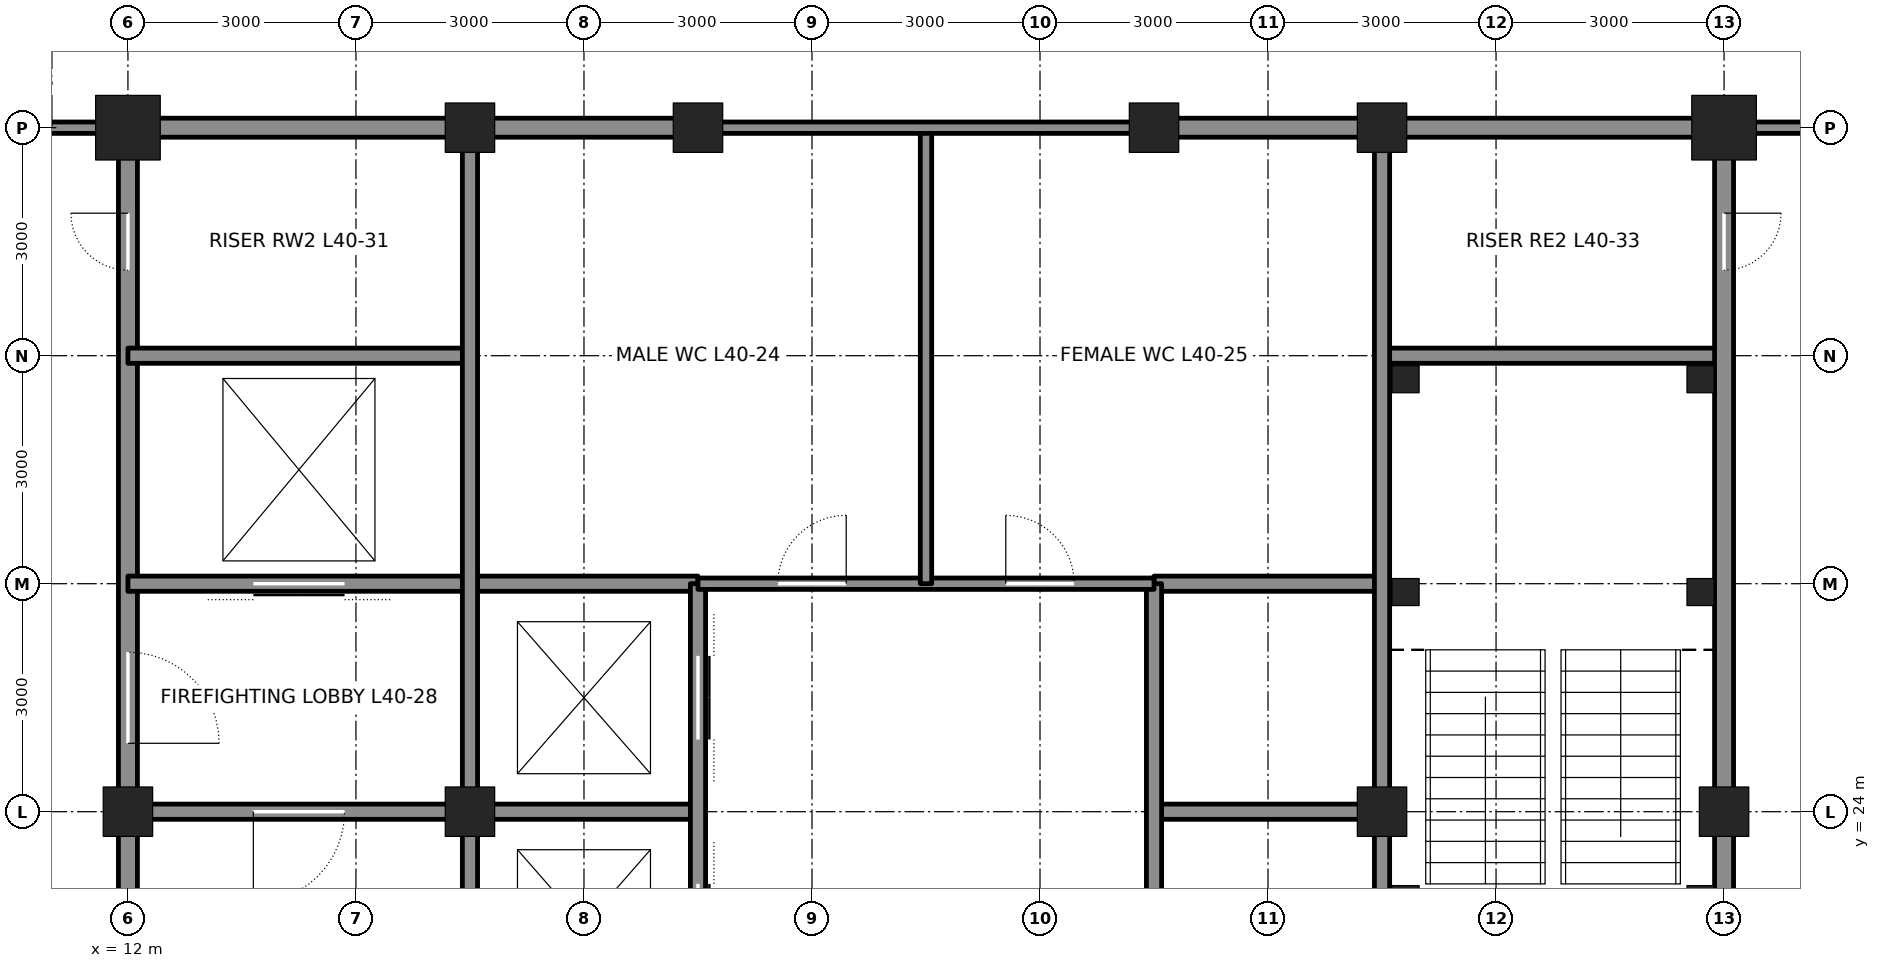
"""IFC4 building model, lengths in metres.
Left out: names, types, materials, properties, quantities, classifications, styles, units other than length and angle.
Written with IfcOpenShell. Run it as: python <this file> out.ifc"""

import sys

from ifc_helpers import new_model, si_unit, direction, frame, frame_2d, origin, origin_2d, place, context, subcontext, project, spatial, rectangle, hollow_rectangle, extrude, element, fill, save


model = new_model("IFC4")
c1 = context("Model", 3, precision=1e-05, world=origin(), true_north=direction((0.0, 1.0)))
c2 = subcontext(c1, "Body", "Model", "MODEL_VIEW")
j1 = project(units=[si_unit("LENGTHUNIT", "METRE"), si_unit("PLANEANGLEUNIT", "RADIAN")], contexts=[c1])
p1 = place(None, origin())
s1 = spatial("IfcSite", under=j1, at=p1, CompositionType="ELEMENT")
p2 = place(p1, origin())
s2 = spatial("IfcBuilding", under=s1, at=p2, CompositionType="ELEMENT")
p3 = place(p2, frame((0.0, 0.0, 184.5)))
s3 = spatial("IfcBuildingStorey", under=s2, at=p3, CompositionType="ELEMENT", Elevation=184.5)
p4 = place(p3, frame((12.0, 33.0, 0.0), z_axis=(0.0, 0.0, 1.0), x_axis=(1.0, 0.0, 0.0)))
e1 = element("IfcColumn", 1, at=p4, inside=s3, PredefinedType="COLUMN", context=c2, shape_type="SweptSolid", body=[
    extrude(hollow_rectangle(XDim=0.85, YDim=0.85, WallThickness=0.085, at=origin_2d()), origin(), (0.0, 0.0, 1.0), 4.2),
])
for number, where, z_axis, x_axis in (
    (2, (16.5, 33.0, 0.0), (0.0, 0.0, 1.0), (1.0, 0.0, 0.0)),
    (3, (19.5, 33.0, 0.0), (0.0, 0.0, 1.0), (1.0, 0.0, 0.0)),
    (4, (25.5, 33.0, 0.0), (0.0, 0.0, 1.0), (1.0, 0.0, 0.0)),
    (5, (28.5, 33.0, 0.0), (0.0, 0.0, 1.0), (1.0, 0.0, 0.0)),
):
    element("IfcColumn", number, at=place(p3, frame(where, z_axis=z_axis, x_axis=x_axis)), inside=s3, PredefinedType="COLUMN", context=c2, shape_type="SweptSolid", body=[
        extrude(hollow_rectangle(XDim=0.65, YDim=0.65, WallThickness=0.065, at=origin_2d()), origin(), (0.0, 0.0, 1.0), 4.2),
    ])
p5 = place(p3, frame((33.0, 33.0, 0.0), z_axis=(0.0, 0.0, 1.0), x_axis=(1.0, 0.0, 0.0)))
e6 = element("IfcColumn", 6, at=p5, inside=s3, PredefinedType="COLUMN", context=c2, shape_type="SweptSolid", body=[
    extrude(hollow_rectangle(XDim=0.85, YDim=0.85, WallThickness=0.085, at=origin_2d()), origin(), (0.0, 0.0, 1.0), 4.2),
])
for number, where, z_axis, x_axis in (
    (7, (12.0, 24.0, 0.0), (0.0, 0.0, 1.0), (1.0, 0.0, 0.0)),
    (8, (33.0, 24.0, 0.0), (0.0, 0.0, 1.0), (1.0, 0.0, 0.0)),
    (9, (16.5, 24.0, 0.0), (0.0, 0.0, 1.0), (1.0, 0.0, 0.0)),
    (10, (28.5, 24.0, 0.0), (0.0, 0.0, 1.0), (1.0, 0.0, 0.0)),
):
    element("IfcColumn", number, at=place(p3, frame(where, z_axis=z_axis, x_axis=x_axis)), inside=s3, PredefinedType="COLUMN", context=c2, shape_type="SweptSolid", body=[
        extrude(hollow_rectangle(XDim=0.65, YDim=0.65, WallThickness=0.065, at=origin_2d()), origin(), (0.0, 0.0, 1.0), 4.2),
    ])
p6 = place(p3, frame((12.0, 21.25, 0.0), z_axis=(0.0, 0.0, 1.0), x_axis=(0.0, 1.0, 0.0)))
e11 = element("IfcWall", 11, at=p6, inside=s3, PredefinedType="SOLIDWALL", context=c2, shape_type="SweptSolid", body=[
    extrude(rectangle(XDim=2.5, YDim=0.25, at=frame_2d((1.25, 0.0))), origin(), (0.0, 0.0, 1.0), 3.113),
])
p7 = place(p3, frame((12.0, 24.25, 0.0), z_axis=(0.0, 0.0, 1.0), x_axis=(0.0, 1.0, 0.0)))
e12 = element("IfcWall", 12, at=p7, inside=s3, PredefinedType="SOLIDWALL", context=c2, shape_type="SweptSolid", body=[
    extrude(rectangle(XDim=8.5, YDim=0.25, at=frame_2d((4.25, 0.0))), origin(), (0.0, 0.0, 1.0), 3.113),
])
p8 = place(p7, frame((0.65, 0.0, 0.0)))
e13 = element("IfcOpeningElement", 13, at=p8, cuts=e12, PredefinedType="OPENING", context=c2, shape_type="SweptSolid", body=[
    extrude(rectangle(XDim=1.2, YDim=2.1, at=frame_2d((0.6, 1.05))), frame((0.0, 0.135, 0.0), z_axis=(0.0, -1.0, 0.0), x_axis=(1.0, 0.0, 0.0)), (0.0, 0.0, 1.0), 0.27),
])
p9 = place(p7, frame((6.875, 0.0, 0.0)))
e14 = element("IfcOpeningElement", 14, at=p9, cuts=e12, PredefinedType="OPENING", context=c2, shape_type="SweptSolid", body=[
    extrude(rectangle(XDim=0.75, YDim=2.1, at=frame_2d((0.375, 1.05))), frame((0.0, 0.135, 0.0), z_axis=(0.0, -1.0, 0.0), x_axis=(1.0, 0.0, 0.0)), (0.0, 0.0, 1.0), 0.27),
])
p10 = place(p3, frame((12.25, 24.0, 0.0), z_axis=(0.0, 0.0, 1.0), x_axis=(1.0, 0.0, 0.0)))
e15 = element("IfcWall", 15, at=p10, inside=s3, PredefinedType="SOLIDWALL", context=c2, shape_type="SweptSolid", body=[
    extrude(rectangle(XDim=4.0, YDim=0.2, at=frame_2d((2.0, 0.0))), origin(), (0.0, 0.0, 1.0), 3.09),
])
p11 = place(p10, frame((1.4, 0.0, 0.0)))
e16 = element("IfcOpeningElement", 16, at=p11, cuts=e15, PredefinedType="OPENING", context=c2, shape_type="SweptSolid", body=[
    extrude(rectangle(XDim=1.2, YDim=2.1, at=frame_2d((0.6, 1.05))), frame((0.0, 0.11, 0.0), z_axis=(0.0, -1.0, 0.0), x_axis=(1.0, 0.0, 0.0)), (0.0, 0.0, 1.0), 0.22),
])
for number, where, z_axis, x_axis in (
    (17, (16.75, 24.0, 0.0), (0.0, 0.0, 1.0), (1.0, 0.0, 0.0)),
    (18, (25.5, 24.0, 0.0), (0.0, 0.0, 1.0), (1.0, 0.0, 0.0)),
):
    element("IfcWall", number, at=place(p3, frame(where, z_axis=z_axis, x_axis=x_axis)), inside=s3, PredefinedType="SOLIDWALL", context=c2, shape_type="SweptSolid", body=[
        extrude(rectangle(XDim=2.75, YDim=0.2, at=frame_2d((1.375, 0.0))), origin(), (0.0, 0.0, 1.0), 3.09),
    ])
p12 = place(p3, frame((12.0, 27.0, 0.0), z_axis=(0.0, 0.0, 1.0), x_axis=(1.0, 0.0, 0.0)))
e19 = element("IfcWall", 19, at=p12, inside=s3, PredefinedType="SOLIDWALL", context=c2, shape_type="SweptSolid", body=[
    extrude(rectangle(XDim=7.5, YDim=0.2, at=frame_2d((3.75, 0.0))), origin(), (0.0, 0.0, 1.0), 4.04),
])
p13 = place(p12, frame((1.65, 0.0, 0.0)))
e20 = element("IfcOpeningElement", 20, at=p13, cuts=e19, PredefinedType="OPENING", context=c2, shape_type="SweptSolid", body=[
    extrude(rectangle(XDim=1.2, YDim=2.1, at=frame_2d((0.6, 1.05))), frame((0.0, 0.11, 0.0), z_axis=(0.0, -1.0, 0.0), x_axis=(1.0, 0.0, 0.0)), (0.0, 0.0, 1.0), 0.22),
])
p14 = place(p3, frame((25.5, 27.0, 0.0), z_axis=(0.0, 0.0, 1.0), x_axis=(1.0, 0.0, 0.0)))
e21 = element("IfcWall", 21, at=p14, inside=s3, PredefinedType="SOLIDWALL", context=c2, shape_type="SweptSolid", body=[
    extrude(rectangle(XDim=3.0, YDim=0.2, at=frame_2d((1.5, 0.0))), origin(), (0.0, 0.0, 1.0), 4.04),
])
for number, where, z_axis, x_axis in (
    (22, (12.0, 30.0, 0.0), (0.0, 0.0, 1.0), (1.0, 0.0, 0.0)),
    (23, (28.5, 30.0, 0.0), (0.0, 0.0, 1.0), (1.0, 0.0, 0.0)),
):
    element("IfcWall", number, at=place(p3, frame(where, z_axis=z_axis, x_axis=x_axis)), inside=s3, PredefinedType="SOLIDWALL", context=c2, shape_type="SweptSolid", body=[
        extrude(rectangle(XDim=4.5, YDim=0.2, at=frame_2d((2.25, 0.0))), origin(), (0.0, 0.0, 1.0), 4.04),
    ])
p15 = place(p3, frame((12.25, 33.0, 0.0), z_axis=(0.0, 0.0, 1.0), x_axis=(1.0, 0.0, 0.0)))
e24 = element("IfcWall", 24, at=p15, inside=s3, PredefinedType="SOLIDWALL", context=c2, shape_type="SweptSolid", body=[
    extrude(rectangle(XDim=4.0, YDim=0.25, at=frame_2d((2.0, 0.0))), origin(), (0.0, 0.0, 1.0), 3.181),
])
for number, where, z_axis, x_axis in (
    (25, (16.75, 33.0, 0.0), (0.0, 0.0, 1.0), (1.0, 0.0, 0.0)),
    (26, (25.75, 33.0, 0.0), (0.0, 0.0, 1.0), (1.0, 0.0, 0.0)),
):
    element("IfcWall", number, at=place(p3, frame(where, z_axis=z_axis, x_axis=x_axis)), inside=s3, PredefinedType="SOLIDWALL", context=c2, shape_type="SweptSolid", body=[
        extrude(rectangle(XDim=2.5, YDim=0.25, at=frame_2d((1.25, 0.0))), origin(), (0.0, 0.0, 1.0), 3.181),
    ])
p16 = place(p3, frame((28.75, 33.0, 0.0), z_axis=(0.0, 0.0, 1.0), x_axis=(1.0, 0.0, 0.0)))
e27 = element("IfcWall", 27, at=p16, inside=s3, PredefinedType="SOLIDWALL", context=c2, shape_type="SweptSolid", body=[
    extrude(rectangle(XDim=4.0, YDim=0.25, at=frame_2d((2.0, 0.0))), origin(), (0.0, 0.0, 1.0), 3.181),
])
p17 = place(p3, frame((16.5, 21.25, 0.0), z_axis=(0.0, 0.0, 1.0), x_axis=(0.0, 1.0, 0.0)))
e28 = element("IfcWall", 28, at=p17, inside=s3, PredefinedType="SOLIDWALL", context=c2, shape_type="SweptSolid", body=[
    extrude(rectangle(XDim=2.5, YDim=0.2, at=frame_2d((1.25, 0.0))), origin(), (0.0, 0.0, 1.0), 3.113),
])
p18 = place(p3, frame((16.5, 24.25, 0.0), z_axis=(0.0, 0.0, 1.0), x_axis=(0.0, 1.0, 0.0)))
e29 = element("IfcWall", 29, at=p18, inside=s3, PredefinedType="SOLIDWALL", context=c2, shape_type="SweptSolid", body=[
    extrude(rectangle(XDim=8.5, YDim=0.2, at=frame_2d((4.25, 0.0))), origin(), (0.0, 0.0, 1.0), 3.113),
])
p19 = place(p3, frame((19.5, 15.0, 0.0), z_axis=(0.0, 0.0, 1.0), x_axis=(0.0, 1.0, 0.0)))
e30 = element("IfcWall", 30, at=p19, inside=s3, PredefinedType="SOLIDWALL", context=c2, shape_type="SweptSolid", body=[
    extrude(rectangle(XDim=12.0, YDim=0.2, at=frame_2d((6.0, 0.0))), origin(), (0.0, 0.0, 1.0), 3.065),
])
p20 = place(p19, frame((0.95, 0.0, 0.0)))
e31 = element("IfcOpeningElement", 31, at=p20, cuts=e30, PredefinedType="OPENING", context=c2, shape_type="SweptSolid", body=[
    extrude(rectangle(XDim=1.1, YDim=2.1, at=frame_2d((0.55, 1.05))), frame((0.0, 0.11, 0.0), z_axis=(0.0, -1.0, 0.0), x_axis=(1.0, 0.0, 0.0)), (0.0, 0.0, 1.0), 0.22),
])
p21 = place(p19, frame((3.95, 0.0, 0.0)))
e32 = element("IfcOpeningElement", 32, at=p21, cuts=e30, PredefinedType="OPENING", context=c2, shape_type="SweptSolid", body=[
    extrude(rectangle(XDim=1.1, YDim=2.1, at=frame_2d((0.55, 1.05))), frame((0.0, 0.11, 0.0), z_axis=(0.0, -1.0, 0.0), x_axis=(1.0, 0.0, 0.0)), (0.0, 0.0, 1.0), 0.22),
])
p22 = place(p19, frame((6.95, 0.0, 0.0)))
e33 = element("IfcOpeningElement", 33, at=p22, cuts=e30, PredefinedType="OPENING", context=c2, shape_type="SweptSolid", body=[
    extrude(rectangle(XDim=1.1, YDim=2.1, at=frame_2d((0.55, 1.05))), frame((0.0, 0.11, 0.0), z_axis=(0.0, -1.0, 0.0), x_axis=(1.0, 0.0, 0.0)), (0.0, 0.0, 1.0), 0.22),
])
p23 = place(p19, frame((9.95, 0.0, 0.0)))
e34 = element("IfcOpeningElement", 34, at=p23, cuts=e30, PredefinedType="OPENING", context=c2, shape_type="SweptSolid", body=[
    extrude(rectangle(XDim=1.1, YDim=2.1, at=frame_2d((0.55, 1.05))), frame((0.0, 0.11, 0.0), z_axis=(0.0, -1.0, 0.0), x_axis=(1.0, 0.0, 0.0)), (0.0, 0.0, 1.0), 0.22),
])
p24 = place(p3, frame((25.5, 15.0, 0.0), z_axis=(0.0, 0.0, 1.0), x_axis=(0.0, 1.0, 0.0)))
e35 = element("IfcWall", 35, at=p24, inside=s3, PredefinedType="SOLIDWALL", context=c2, shape_type="SweptSolid", body=[
    extrude(rectangle(XDim=12.0, YDim=0.2, at=frame_2d((6.0, 0.0))), origin(), (0.0, 0.0, 1.0), 3.065),
])
p25 = place(p3, frame((28.5, 21.25, 0.0), z_axis=(0.0, 0.0, 1.0), x_axis=(0.0, 1.0, 0.0)))
e36 = element("IfcWall", 36, at=p25, inside=s3, PredefinedType="SOLIDWALL", context=c2, shape_type="SweptSolid", body=[
    extrude(rectangle(XDim=2.5, YDim=0.2, at=frame_2d((1.25, 0.0))), origin(), (0.0, 0.0, 1.0), 3.113),
])
p26 = place(p3, frame((28.5, 24.25, 0.0), z_axis=(0.0, 0.0, 1.0), x_axis=(0.0, 1.0, 0.0)))
e37 = element("IfcWall", 37, at=p26, inside=s3, PredefinedType="SOLIDWALL", context=c2, shape_type="SweptSolid", body=[
    extrude(rectangle(XDim=8.5, YDim=0.2, at=frame_2d((4.25, 0.0))), origin(), (0.0, 0.0, 1.0), 3.113),
])
p27 = place(p3, frame((33.0, 21.25, 0.0), z_axis=(0.0, 0.0, 1.0), x_axis=(0.0, 1.0, 0.0)))
e38 = element("IfcWall", 38, at=p27, inside=s3, PredefinedType="SOLIDWALL", context=c2, shape_type="SweptSolid", body=[
    extrude(rectangle(XDim=2.5, YDim=0.25, at=frame_2d((1.25, 0.0))), origin(), (0.0, 0.0, 1.0), 3.113),
])
p28 = place(p3, frame((33.0, 24.25, 0.0), z_axis=(0.0, 0.0, 1.0), x_axis=(0.0, 1.0, 0.0)))
e39 = element("IfcWall", 39, at=p28, inside=s3, PredefinedType="SOLIDWALL", context=c2, shape_type="SweptSolid", body=[
    extrude(rectangle(XDim=8.5, YDim=0.25, at=frame_2d((4.25, 0.0))), origin(), (0.0, 0.0, 1.0), 3.113),
])
p29 = place(p28, frame((6.875, 0.0, 0.0)))
e40 = element("IfcOpeningElement", 40, at=p29, cuts=e39, PredefinedType="OPENING", context=c2, shape_type="SweptSolid", body=[
    extrude(rectangle(XDim=0.75, YDim=2.1, at=frame_2d((0.375, 1.05))), frame((0.0, 0.135, 0.0), z_axis=(0.0, -1.0, 0.0), x_axis=(1.0, 0.0, 0.0)), (0.0, 0.0, 1.0), 0.27),
])
p30 = place(p3, frame((19.5, 27.0, 0.0), z_axis=(0.0, 0.0, 1.0), x_axis=(1.0, 0.0, 0.0)))
e41 = element("IfcWall", 41, at=p30, inside=s3, PredefinedType="PARTITIONING", context=c2, shape_type="SweptSolid", body=[
    extrude(rectangle(XDim=6.0, YDim=0.15, at=frame_2d((3.0, 0.0))), origin(), (0.0, 0.0, 1.0), 4.04),
])
p31 = place(p30, frame((1.05, 0.0, 0.0)))
e42 = element("IfcOpeningElement", 42, at=p31, cuts=e41, PredefinedType="OPENING", context=c2, shape_type="SweptSolid", body=[
    extrude(rectangle(XDim=0.9, YDim=2.1, at=frame_2d((0.45, 1.05))), frame((0.0, 0.085, 0.0), z_axis=(0.0, -1.0, 0.0), x_axis=(1.0, 0.0, 0.0)), (0.0, 0.0, 1.0), 0.17),
])
p32 = place(p30, frame((4.05, 0.0, 0.0)))
e43 = element("IfcOpeningElement", 43, at=p32, cuts=e41, PredefinedType="OPENING", context=c2, shape_type="SweptSolid", body=[
    extrude(rectangle(XDim=0.9, YDim=2.1, at=frame_2d((0.45, 1.05))), frame((0.0, 0.085, 0.0), z_axis=(0.0, -1.0, 0.0), x_axis=(1.0, 0.0, 0.0)), (0.0, 0.0, 1.0), 0.17),
])
p33 = place(p3, frame((22.5, 27.0, 0.0), z_axis=(0.0, 0.0, 1.0), x_axis=(0.0, 1.0, 0.0)))
e44 = element("IfcWall", 44, at=p33, inside=s3, PredefinedType="PARTITIONING", context=c2, shape_type="SweptSolid", body=[
    extrude(rectangle(XDim=6.0, YDim=0.15, at=frame_2d((3.0, 0.0))), origin(), (0.0, 0.0, 1.0), 4.04),
])
p34 = place(p3, frame((19.5, 33.0, 0.0), z_axis=(0.0, 0.0, 1.0), x_axis=(1.0, 0.0, 0.0)))
e45 = element("IfcWall", 45, at=p34, inside=s3, PredefinedType="PARTITIONING", context=c2, shape_type="SweptSolid", body=[
    extrude(rectangle(XDim=6.0, YDim=0.15, at=frame_2d((3.0, 0.0))), origin(), (0.0, 0.0, 1.0), 3.181),
])
p35 = place(p3, frame((9.0, 33.0, 0.0), z_axis=(0.0, 0.0, 1.0), x_axis=(1.0, 0.0, 0.0)))
e46 = element("IfcWall", 46, at=p35, inside=s3, PredefinedType="PARTITIONING", context=c2, shape_type="SweptSolid", body=[
    extrude(rectangle(XDim=3.0, YDim=0.15, at=frame_2d((1.5, 0.0))), origin(), (0.0, 0.0, 1.0), 3.271),
])
p36 = place(p35, frame((1.0, 0.0, 0.0)))
e47 = element("IfcOpeningElement", 47, at=p36, cuts=e46, PredefinedType="OPENING", context=c2, shape_type="SweptSolid", body=[
    extrude(rectangle(XDim=1.0, YDim=2.4, at=frame_2d((0.5, 1.2))), frame((0.0, 0.085, 0.0), z_axis=(0.0, -1.0, 0.0), x_axis=(1.0, 0.0, 0.0)), (0.0, 0.0, 1.0), 0.17),
])
p37 = place(p3, frame((33.0, 33.0, 0.0), z_axis=(0.0, 0.0, 1.0), x_axis=(1.0, 0.0, 0.0)))
e48 = element("IfcWall", 48, at=p37, inside=s3, PredefinedType="PARTITIONING", context=c2, shape_type="SweptSolid", body=[
    extrude(rectangle(XDim=1.8, YDim=0.15, at=frame_2d((0.9, 0.0))), origin(), (0.0, 0.0, 1.0), 3.271),
])
for number, where, z_axis, x_axis in (
    (49, (28.81, 29.69, 0.0), (0.0, 0.0, 1.0), (1.0, 0.0, 0.0)),
    (50, (32.69, 29.69, 0.0), (0.0, 0.0, 1.0), (1.0, 0.0, 0.0)),
    (51, (28.81, 26.89, 0.0), (0.0, 0.0, 1.0), (1.0, 0.0, 0.0)),
    (52, (32.69, 26.89, 0.0), (0.0, 0.0, 1.0), (1.0, 0.0, 0.0)),
    (53, (28.81, 22.85, 0.0), (0.0, 0.0, 1.0), (1.0, 0.0, 0.0)),
    (54, (32.69, 22.85, 0.0), (0.0, 0.0, 1.0), (1.0, 0.0, 0.0)),
):
    element("IfcColumn", number, at=place(p3, frame(where, z_axis=z_axis, x_axis=x_axis)), inside=s3, PredefinedType="COLUMN", context=c2, shape_type="SweptSolid", body=[
        extrude(hollow_rectangle(XDim=0.356, YDim=0.356, WallThickness=0.015, at=origin_2d()), origin(), (0.0, 0.0, 1.0), 4.2),
    ])
p38 = place(p11, frame((1.2, 0.0, 0.0), z_axis=(0.0, 0.0, 1.0), x_axis=(-1.0, 0.0, 0.0)))
e55 = element("IfcDoor", 55, at=p38, inside=s3, OperationType="SINGLE_SWING_RIGHT", PredefinedType="DOOR", context=c2, shape_type="SweptSolid", body=[
    extrude(rectangle(XDim=1.2, YDim=2.1, at=frame_2d((0.6, 1.05))), frame((0.0, 0.025, 0.0), z_axis=(0.0, -1.0, 0.0), x_axis=(1.0, 0.0, 0.0)), (0.0, 0.0, 1.0), 0.05),
])
fill(e16, e55)
p39 = place(p8, frame((1.2, 0.0, 0.0), z_axis=(0.0, 0.0, 1.0), x_axis=(-1.0, 0.0, 0.0)))
e56 = element("IfcDoor", 56, at=p39, inside=s3, OperationType="SINGLE_SWING_RIGHT", PredefinedType="DOOR", context=c2, shape_type="SweptSolid", body=[
    extrude(rectangle(XDim=1.2, YDim=2.1, at=frame_2d((0.6, 1.05))), frame((0.0, 0.025, 0.0), z_axis=(0.0, -1.0, 0.0), x_axis=(1.0, 0.0, 0.0)), (0.0, 0.0, 1.0), 0.05),
])
fill(e13, e56)
p40 = place(p13, origin())
e57 = element("IfcDoor", 57, at=p40, inside=s3, OperationType="DOUBLE_DOOR_SLIDING", PredefinedType="DOOR", context=c2, shape_type="SweptSolid", body=[
    extrude(rectangle(XDim=1.2, YDim=2.1, at=frame_2d((0.6, 1.05))), frame((0.0, 0.025, 0.0), z_axis=(0.0, -1.0, 0.0), x_axis=(1.0, 0.0, 0.0)), (0.0, 0.0, 1.0), 0.05),
])
fill(e20, e57)
p41 = place(p9, origin())
e58 = element("IfcDoor", 58, at=p41, inside=s3, OperationType="SINGLE_SWING_RIGHT", PredefinedType="DOOR", context=c2, shape_type="SweptSolid", body=[
    extrude(rectangle(XDim=0.75, YDim=2.1, at=frame_2d((0.375, 1.05))), frame((0.0, 0.025, 0.0), z_axis=(0.0, -1.0, 0.0), x_axis=(1.0, 0.0, 0.0)), (0.0, 0.0, 1.0), 0.05),
])
fill(e14, e58)
p42 = place(p29, frame((0.75, 0.0, 0.0), z_axis=(0.0, 0.0, 1.0), x_axis=(-1.0, 0.0, 0.0)))
e59 = element("IfcDoor", 59, at=p42, inside=s3, OperationType="SINGLE_SWING_LEFT", PredefinedType="DOOR", context=c2, shape_type="SweptSolid", body=[
    extrude(rectangle(XDim=0.75, YDim=2.1, at=frame_2d((0.375, 1.05))), frame((0.0, 0.025, 0.0), z_axis=(0.0, -1.0, 0.0), x_axis=(1.0, 0.0, 0.0)), (0.0, 0.0, 1.0), 0.05),
])
fill(e40, e59)
p43 = place(p31, origin())
e60 = element("IfcDoor", 60, at=p43, inside=s3, OperationType="SINGLE_SWING_RIGHT", PredefinedType="DOOR", context=c2, shape_type="SweptSolid", body=[
    extrude(rectangle(XDim=0.9, YDim=2.1, at=frame_2d((0.45, 1.05))), frame((0.0, 0.025, 0.0), z_axis=(0.0, -1.0, 0.0), x_axis=(1.0, 0.0, 0.0)), (0.0, 0.0, 1.0), 0.05),
])
fill(e42, e60)
p44 = place(p32, origin())
e61 = element("IfcDoor", 61, at=p44, inside=s3, OperationType="SINGLE_SWING_LEFT", PredefinedType="DOOR", context=c2, shape_type="SweptSolid", body=[
    extrude(rectangle(XDim=0.9, YDim=2.1, at=frame_2d((0.45, 1.05))), frame((0.0, 0.025, 0.0), z_axis=(0.0, -1.0, 0.0), x_axis=(1.0, 0.0, 0.0)), (0.0, 0.0, 1.0), 0.05),
])
fill(e43, e61)
p45 = place(p22, origin())
e62 = element("IfcDoor", 62, at=p45, inside=s3, OperationType="DOUBLE_DOOR_SLIDING", PredefinedType="DOOR", context=c2, shape_type="SweptSolid", body=[
    extrude(rectangle(XDim=1.1, YDim=2.1, at=frame_2d((0.55, 1.05))), frame((0.0, 0.025, 0.0), z_axis=(0.0, -1.0, 0.0), x_axis=(1.0, 0.0, 0.0)), (0.0, 0.0, 1.0), 0.05),
])
fill(e33, e62)
p46 = place(p23, origin())
e63 = element("IfcDoor", 63, at=p46, inside=s3, OperationType="DOUBLE_DOOR_SLIDING", PredefinedType="DOOR", context=c2, shape_type="SweptSolid", body=[
    extrude(rectangle(XDim=1.1, YDim=2.1, at=frame_2d((0.55, 1.05))), frame((0.0, 0.025, 0.0), z_axis=(0.0, -1.0, 0.0), x_axis=(1.0, 0.0, 0.0)), (0.0, 0.0, 1.0), 0.05),
])
fill(e34, e63)
save(model, sys.argv[1])
